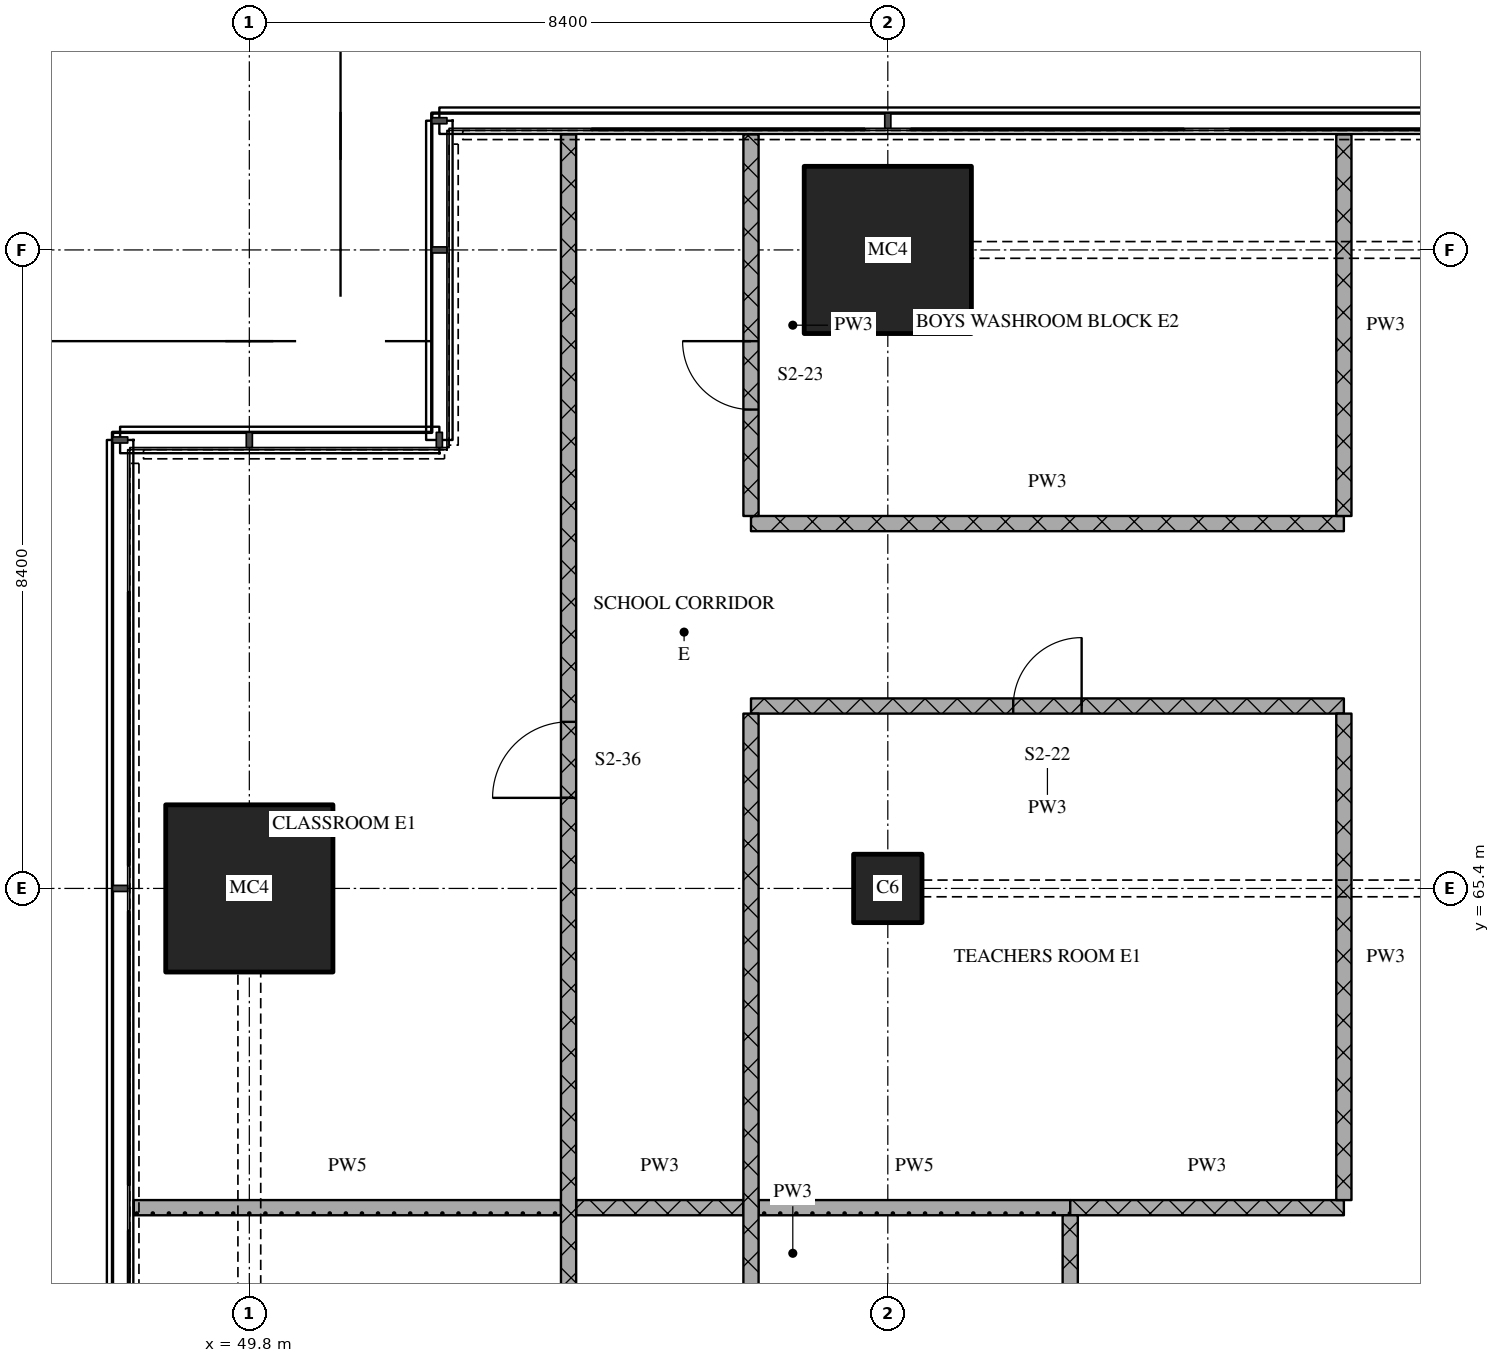
"""IFC4 building model, lengths in metres.
Left out: names, types, materials, properties, quantities, classifications, styles, units other than length and angle.
Written with IfcOpenShell. Run it as: python <this file> out.ifc"""

import sys

from ifc_helpers import new_model, si_unit, direction, frame, frame_2d, origin, origin_2d, place, context, subcontext, project, spatial, rectangle, extrude, element, fill, save


model = new_model("IFC4")
c1 = context("Model", 3, precision=1e-05, world=origin(), true_north=direction((0.0, 1.0)))
c2 = subcontext(c1, "Body", "Model", "MODEL_VIEW")
j1 = project(units=[si_unit("LENGTHUNIT", "METRE"), si_unit("PLANEANGLEUNIT", "RADIAN")], contexts=[c1])
p1 = place(None, origin())
s1 = spatial("IfcSite", under=j1, at=p1, CompositionType="ELEMENT")
p2 = place(p1, origin())
s2 = spatial("IfcBuilding", under=s1, at=p2, CompositionType="ELEMENT")
p3 = place(p2, frame((0.0, 0.0, 28.2)))
s3 = spatial("IfcBuildingStorey", under=s2, at=p3, CompositionType="ELEMENT", Elevation=28.2)
p4 = place(p3, frame((49.8, 65.4, 0.0), z_axis=(0.0, 0.0, 1.0), x_axis=(1.0, 0.0, 0.0)))
e1 = element("IfcColumn", 1, at=p4, inside=s3, PredefinedType="COLUMN", context=c2, shape_type="SweptSolid", body=[
    extrude(rectangle(XDim=2.2, YDim=2.2, at=origin_2d()), origin(), (0.0, 0.0, 1.0), 4.5),
])
p5 = place(p3, frame((58.2, 65.4, 0.0), z_axis=(0.0, 0.0, 1.0), x_axis=(1.0, 0.0, 0.0)))
e2 = element("IfcColumn", 2, at=p5, inside=s3, PredefinedType="COLUMN", context=c2, shape_type="SweptSolid", body=[
    extrude(rectangle(XDim=0.9, YDim=0.9, at=origin_2d()), origin(), (0.0, 0.0, 1.0), 4.5),
])
p6 = place(p3, frame((58.2, 73.8, 0.0), z_axis=(0.0, 0.0, 1.0), x_axis=(1.0, 0.0, 0.0)))
e3 = element("IfcColumn", 3, at=p6, inside=s3, PredefinedType="COLUMN", context=c2, shape_type="SweptSolid", body=[
    extrude(rectangle(XDim=2.2, YDim=2.2, at=origin_2d()), origin(), (0.0, 0.0, 1.0), 4.5),
])
p7 = place(p3, frame((54.1, 61.2, 0.0), z_axis=(0.0, 0.0, 1.0), x_axis=(1.0, 0.0, 0.0)))
e4 = element("IfcWall", 4, at=p7, inside=s3, PredefinedType="PARTITIONING", context=c2, shape_type="SweptSolid", body=[
    extrude(rectangle(XDim=2.2, YDim=0.2, at=frame_2d((1.1, 0.0))), origin(), (0.0, 0.0, 1.0), 4.2),
])
p8 = place(p3, frame((60.6, 61.2, 0.0), z_axis=(0.0, 0.0, 1.0), x_axis=(1.0, 0.0, 0.0)))
e5 = element("IfcWall", 5, at=p8, inside=s3, PredefinedType="PARTITIONING", context=c2, shape_type="SweptSolid", body=[
    extrude(rectangle(XDim=3.6, YDim=0.2, at=frame_2d((1.8, 0.0))), origin(), (0.0, 0.0, 1.0), 4.2),
])
p9 = place(p3, frame((48.28, 61.2, 0.0), z_axis=(0.0, 0.0, 1.0), x_axis=(1.0, 0.0, 0.0)))
e6 = element("IfcWall", 6, at=p9, inside=s3, PredefinedType="PARTITIONING", context=c2, shape_type="SweptSolid", body=[
    extrude(rectangle(XDim=5.62, YDim=0.2, at=frame_2d((2.81, 0.0))), origin(), (0.0, 0.0, 1.0), 4.2),
])
p10 = place(p3, frame((56.5, 61.2, 0.0), z_axis=(0.0, 0.0, 1.0), x_axis=(1.0, 0.0, 0.0)))
e7 = element("IfcWall", 7, at=p10, inside=s3, PredefinedType="PARTITIONING", context=c2, shape_type="SweptSolid", body=[
    extrude(rectangle(XDim=4.1, YDim=0.2, at=frame_2d((2.05, 0.0))), origin(), (0.0, 0.0, 1.0), 4.2),
])
p11 = place(p3, frame((64.2, 67.8, 0.0), z_axis=(0.0, 0.0, 1.0), x_axis=(-1.0, 0.0, 0.0)))
e8 = element("IfcWall", 8, at=p11, inside=s3, PredefinedType="PARTITIONING", context=c2, shape_type="SweptSolid", body=[
    extrude(rectangle(XDim=7.8, YDim=0.2, at=frame_2d((3.9, 0.0))), origin(), (0.0, 0.0, 1.0), 4.2),
])
p12 = place(p11, frame((3.45, 0.0, 0.0)))
e9 = element("IfcOpeningElement", 9, at=p12, cuts=e8, PredefinedType="OPENING", context=c2, shape_type="SweptSolid", body=[
    extrude(rectangle(XDim=0.9, YDim=2.1, at=frame_2d((0.45, 1.05))), frame((0.0, 0.11, 0.0), z_axis=(0.0, -1.0, 0.0), x_axis=(1.0, 0.0, 0.0)), (0.0, 0.0, 1.0), 0.22),
])
p13 = place(p3, frame((56.4, 70.2, 0.0), z_axis=(0.0, 0.0, 1.0), x_axis=(1.0, 0.0, 0.0)))
e10 = element("IfcWall", 10, at=p13, inside=s3, PredefinedType="PARTITIONING", context=c2, shape_type="SweptSolid", body=[
    extrude(rectangle(XDim=7.8, YDim=0.2, at=frame_2d((3.9, 0.0))), origin(), (0.0, 0.0, 1.0), 4.2),
])
p14 = place(p3, frame((54.0, 43.3, 0.0), z_axis=(0.0, 0.0, 1.0), x_axis=(0.0, 1.0, 0.0)))
e11 = element("IfcWall", 11, at=p14, inside=s3, PredefinedType="PARTITIONING", context=c2, shape_type="SweptSolid", body=[
    extrude(rectangle(XDim=32.02, YDim=0.2, at=frame_2d((16.01, 0.0))), origin(), (0.0, 0.0, 1.0), 4.2),
])
p15 = place(p14, frame((8.4, 0.0, 0.0)))
e12 = element("IfcOpeningElement", 12, at=p15, cuts=e11, PredefinedType="OPENING", context=c2, shape_type="SweptSolid", body=[
    extrude(rectangle(XDim=1.0, YDim=2.1, at=frame_2d((0.5, 1.05))), frame((0.0, 0.11, 0.0), z_axis=(0.0, -1.0, 0.0), x_axis=(1.0, 0.0, 0.0)), (0.0, 0.0, 1.0), 0.22),
])
p16 = place(p14, frame((23.292, 0.0, 0.0)))
e13 = element("IfcOpeningElement", 13, at=p16, cuts=e11, PredefinedType="OPENING", context=c2, shape_type="SweptSolid", body=[
    extrude(rectangle(XDim=1.0, YDim=2.1, at=frame_2d((0.5, 1.05))), frame((0.0, 0.11, 0.0), z_axis=(0.0, -1.0, 0.0), x_axis=(1.0, 0.0, 0.0)), (0.0, 0.0, 1.0), 0.22),
])
p17 = place(p3, frame((56.4, 67.7, 0.0), z_axis=(0.0, 0.0, 1.0), x_axis=(0.0, -1.0, 0.0)))
e14 = element("IfcWall", 14, at=p17, inside=s3, PredefinedType="PARTITIONING", context=c2, shape_type="SweptSolid", body=[
    extrude(rectangle(XDim=14.2, YDim=0.2, at=frame_2d((7.1, 0.0))), origin(), (0.0, 0.0, 1.0), 4.2),
])
p18 = place(p17, frame((7.55, 0.0, 0.0)))
e15 = element("IfcOpeningElement", 15, at=p18, cuts=e14, PredefinedType="OPENING", context=c2, shape_type="SweptSolid", body=[
    extrude(rectangle(XDim=0.9, YDim=2.1, at=frame_2d((0.45, 1.05))), frame((0.0, 0.11, 0.0), z_axis=(0.0, -1.0, 0.0), x_axis=(1.0, 0.0, 0.0)), (0.0, 0.0, 1.0), 0.22),
])
p19 = place(p17, frame((11.45, 0.0, 0.0)))
e16 = element("IfcOpeningElement", 16, at=p19, cuts=e14, PredefinedType="OPENING", context=c2, shape_type="SweptSolid", body=[
    extrude(rectangle(XDim=0.9, YDim=2.1, at=frame_2d((0.45, 1.05))), frame((0.0, 0.11, 0.0), z_axis=(0.0, -1.0, 0.0), x_axis=(1.0, 0.0, 0.0)), (0.0, 0.0, 1.0), 0.22),
])
p20 = place(p3, frame((56.4, 75.32, 0.0), z_axis=(0.0, 0.0, 1.0), x_axis=(0.0, -1.0, 0.0)))
e17 = element("IfcWall", 17, at=p20, inside=s3, PredefinedType="PARTITIONING", context=c2, shape_type="SweptSolid", body=[
    extrude(rectangle(XDim=5.02, YDim=0.2, at=frame_2d((2.51, 0.0))), origin(), (0.0, 0.0, 1.0), 4.2),
])
p21 = place(p20, frame((2.72, 0.0, 0.0)))
e18 = element("IfcOpeningElement", 18, at=p21, cuts=e17, PredefinedType="OPENING", context=c2, shape_type="SweptSolid", body=[
    extrude(rectangle(XDim=0.9, YDim=2.1, at=frame_2d((0.45, 1.05))), frame((0.0, 0.11, 0.0), z_axis=(0.0, -1.0, 0.0), x_axis=(1.0, 0.0, 0.0)), (0.0, 0.0, 1.0), 0.22),
])
p22 = place(p3, frame((60.6, 61.1, 0.0), z_axis=(0.0, 0.0, 1.0), x_axis=(0.0, -1.0, 0.0)))
e19 = element("IfcWall", 19, at=p22, inside=s3, PredefinedType="PARTITIONING", context=c2, shape_type="SweptSolid", body=[
    extrude(rectangle(XDim=7.6, YDim=0.2, at=frame_2d((3.8, 0.0))), origin(), (0.0, 0.0, 1.0), 4.2),
])
p23 = place(p3, frame((64.2, 67.7, 0.0), z_axis=(0.0, 0.0, 1.0), x_axis=(0.0, -1.0, 0.0)))
e20 = element("IfcWall", 20, at=p23, inside=s3, PredefinedType="PARTITIONING", context=c2, shape_type="SweptSolid", body=[
    extrude(rectangle(XDim=6.4, YDim=0.2, at=frame_2d((3.2, 0.0))), origin(), (0.0, 0.0, 1.0), 4.2),
])
p24 = place(p3, frame((64.2, 75.32, 0.0), z_axis=(0.0, 0.0, 1.0), x_axis=(0.0, -1.0, 0.0)))
e21 = element("IfcWall", 21, at=p24, inside=s3, PredefinedType="PARTITIONING", context=c2, shape_type="SweptSolid", body=[
    extrude(rectangle(XDim=5.02, YDim=0.2, at=frame_2d((2.51, 0.0))), origin(), (0.0, 0.0, 1.0), 4.2),
])
p25 = place(p12, origin())
e22 = element("IfcDoor", 22, at=p25, inside=s3, OperationType="SINGLE_SWING_RIGHT", PredefinedType="DOOR", context=c2, shape_type="SweptSolid", body=[
    extrude(rectangle(XDim=0.9, YDim=2.1, at=frame_2d((0.45, 1.05))), frame((0.0, 0.025, 0.0), z_axis=(0.0, -1.0, 0.0), x_axis=(1.0, 0.0, 0.0)), (0.0, 0.0, 1.0), 0.05),
])
fill(e9, e22)
p26 = place(p16, origin())
e23 = element("IfcDoor", 23, at=p26, inside=s3, OperationType="SINGLE_SWING_LEFT", PredefinedType="DOOR", context=c2, shape_type="SweptSolid", body=[
    extrude(rectangle(XDim=1.0, YDim=2.1, at=frame_2d((0.5, 1.05))), frame((0.0, 0.025, 0.0), z_axis=(0.0, -1.0, 0.0), x_axis=(1.0, 0.0, 0.0)), (0.0, 0.0, 1.0), 0.05),
])
fill(e13, e23)
p27 = place(p21, origin())
e24 = element("IfcDoor", 24, at=p27, inside=s3, OperationType="SINGLE_SWING_RIGHT", PredefinedType="DOOR", context=c2, shape_type="SweptSolid", body=[
    extrude(rectangle(XDim=0.9, YDim=2.1, at=frame_2d((0.45, 1.05))), frame((0.0, 0.025, 0.0), z_axis=(0.0, -1.0, 0.0), x_axis=(1.0, 0.0, 0.0)), (0.0, 0.0, 1.0), 0.05),
])
fill(e18, e24)
save(model, sys.argv[1])
